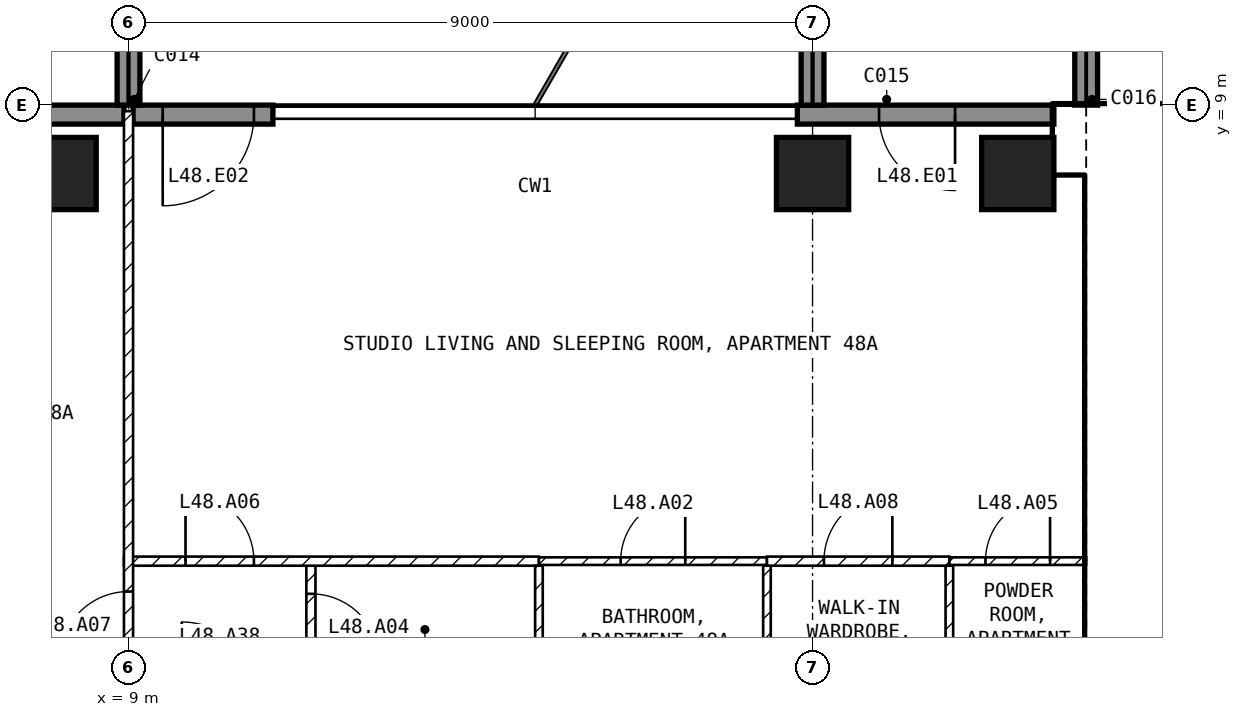
"""IFC4 building model, lengths in metres.
Left out: names, types, materials, properties, quantities, classifications, styles, units other than length and angle.
Written with IfcOpenShell. Run it as: python <this file> out.ifc"""

import sys

from ifc_helpers import new_model, si_unit, direction, frame, frame_2d, origin, origin_2d, place, context, subcontext, project, spatial, rectangle, extrude, element, fill, save


model = new_model("IFC4")
c1 = context("Model", 3, precision=1e-05, world=origin(), true_north=direction((0.0, 1.0)))
c2 = subcontext(c1, "Body", "Model", "MODEL_VIEW")
j1 = project(units=[si_unit("LENGTHUNIT", "METRE"), si_unit("PLANEANGLEUNIT", "RADIAN")], contexts=[c1])
p1 = place(None, origin())
s1 = spatial("IfcSite", under=j1, at=p1, CompositionType="ELEMENT")
p2 = place(p1, origin())
s2 = spatial("IfcBuilding", under=s1, at=p2, CompositionType="ELEMENT")
p3 = place(p2, frame((0.0, 0.0, 194.6)))
s3 = spatial("IfcBuildingStorey", under=s2, at=p3, CompositionType="ELEMENT", Elevation=194.6)
for number, where, z_axis, x_axis in (
    (1, (8.1, 8.1, -0.25), (0.0, 0.0, 1.0), (1.0, 0.0, 0.0)),
    (2, (18.0, 8.1, -0.25), (0.0, 0.0, 1.0), (1.0, 0.0, 0.0)),
    (3, (20.7, 8.1, -0.25), (0.0, 0.0, 1.0), (1.0, 0.0, 0.0)),
):
    element("IfcColumn", number, at=place(p3, frame(where, z_axis=z_axis, x_axis=x_axis)), inside=s3, PredefinedType="COLUMN", context=c2, shape_type="SweptSolid", body=[
        extrude(rectangle(XDim=0.95, YDim=0.95, at=origin_2d()), origin(), (0.0, 0.0, 1.0), 3.5),
    ])
p4 = place(p3, frame((21.175, 8.875, 0.0), z_axis=(0.0, 0.0, 1.0), x_axis=(-1.0, 0.0, 0.0)))
e4 = element("IfcWall", 4, at=p4, inside=s3, PredefinedType="SOLIDWALL", context=c2, shape_type="SweptSolid", body=[
    extrude(rectangle(XDim=3.375, YDim=0.25, at=frame_2d((1.688, 0.0))), origin(), (0.0, 0.0, 1.0), 3.25),
])
p5 = place(p4, frame((1.3, 0.0, 0.0)))
e5 = element("IfcOpeningElement", 5, at=p5, cuts=e4, PredefinedType="OPENING", context=c2, shape_type="SweptSolid", body=[
    extrude(rectangle(XDim=1.0, YDim=2.4, at=frame_2d((0.5, 1.2))), frame((0.0, 0.135, 0.0), z_axis=(0.0, -1.0, 0.0), x_axis=(1.0, 0.0, 0.0)), (0.0, 0.0, 1.0), 0.27),
])
p6 = place(p3, frame((10.9, 8.875, 0.0), z_axis=(0.0, 0.0, 1.0), x_axis=(-1.0, 0.0, 0.0)))
e6 = element("IfcWall", 6, at=p6, inside=s3, PredefinedType="SOLIDWALL", context=c2, shape_type="SweptSolid", body=[
    extrude(rectangle(XDim=1.84, YDim=0.25, at=frame_2d((0.92, 0.0))), origin(), (0.0, 0.0, 1.0), 3.25),
])
p7 = place(p6, frame((0.25, 0.0, 0.0)))
e7 = element("IfcOpeningElement", 7, at=p7, cuts=e6, PredefinedType="OPENING", context=c2, shape_type="SweptSolid", body=[
    extrude(rectangle(XDim=1.2, YDim=2.4, at=frame_2d((0.6, 1.2))), frame((0.0, 0.135, 0.0), z_axis=(0.0, -1.0, 0.0), x_axis=(1.0, 0.0, 0.0)), (0.0, 0.0, 1.0), 0.27),
])
p8 = place(p3, frame((8.94, 8.875, 0.0), z_axis=(0.0, 0.0, 1.0), x_axis=(-1.0, 0.0, 0.0)))
e8 = element("IfcWall", 8, at=p8, inside=s3, PredefinedType="SOLIDWALL", context=c2, shape_type="SweptSolid", body=[
    extrude(rectangle(XDim=3.115, YDim=0.25, at=frame_2d((1.558, 0.0))), origin(), (0.0, 0.0, 1.0), 3.25),
])
p9 = place(p8, frame((1.665, 0.0, 0.0)))
e9 = element("IfcOpeningElement", 9, at=p9, cuts=e8, PredefinedType="OPENING", context=c2, shape_type="SweptSolid", body=[
    extrude(rectangle(XDim=1.2, YDim=2.4, at=frame_2d((0.6, 1.2))), frame((0.0, 0.135, 0.0), z_axis=(0.0, -1.0, 0.0), x_axis=(1.0, 0.0, 0.0)), (0.0, 0.0, 1.0), 0.27),
])
for number, where, z_axis, x_axis in (
    (10, (9.0, 9.0, 0.0), (0.0, 0.0, 1.0), (0.0, 1.0, 0.0)),
    (11, (18.0, 9.0, 0.0), (0.0, 0.0, 1.0), (0.0, 1.0, 0.0)),
    (12, (21.6, 9.0, 0.0), (0.0, 0.0, 1.0), (0.0, 1.0, 0.0)),
):
    element("IfcWall", number, at=place(p3, frame(where, z_axis=z_axis, x_axis=x_axis)), inside=s3, PredefinedType="SOLIDWALL", context=c2, shape_type="SweptSolid", body=[
        extrude(rectangle(XDim=2.7, YDim=0.3, at=frame_2d((1.35, 0.0))), origin(), (0.0, 0.0, 1.0), 3.25),
    ])
p10 = place(p3, frame((21.175, 8.55, 0.0), z_axis=(0.0, 0.0, 1.0), x_axis=(1.0, 0.0, 0.0)))
e13 = element("IfcWall", 13, at=p10, inside=s3, PredefinedType="SHEAR", context=c2, shape_type="SweptSolid", body=[
    extrude(rectangle(XDim=8.425, YDim=0.9, at=frame_2d((4.212, 0.0))), origin(), (0.0, 0.0, 1.0), 3.25),
])
p11 = place(p3, frame((21.825, 1.2, 0.0), z_axis=(0.0, 0.0, 1.0), x_axis=(0.0, 1.0, 0.0)))
e14 = element("IfcWall", 14, at=p11, inside=s3, PredefinedType="SHEAR", context=c2, shape_type="SweptSolid", body=[
    extrude(rectangle(XDim=6.9, YDim=0.45, at=frame_2d((3.45, 0.0))), origin(), (0.0, 0.0, 1.0), 3.25),
])
p12 = place(p3, frame((22.05, 5.15, 0.0), z_axis=(0.0, 0.0, 1.0), x_axis=(1.0, 0.0, 0.0)))
e15 = element("IfcWall", 15, at=p12, inside=s3, PredefinedType="SOLIDWALL", context=c2, shape_type="SweptSolid", body=[
    extrude(rectangle(XDim=6.3, YDim=0.2, at=frame_2d((3.15, 0.0))), origin(), (0.0, 0.0, 1.0), 3.25),
])
p13 = place(p12, frame((0.2, 0.0, 0.0)))
e16 = element("IfcOpeningElement", 16, at=p13, cuts=e15, PredefinedType="OPENING", context=c2, shape_type="SweptSolid", body=[
    extrude(rectangle(XDim=1.0, YDim=2.1, at=frame_2d((0.5, 1.05))), frame((0.0, 0.11, 0.0), z_axis=(0.0, -1.0, 0.0), x_axis=(1.0, 0.0, 0.0)), (0.0, 0.0, 1.0), 0.22),
])
p14 = place(p3, frame((11.4, 2.94, 0.0), z_axis=(0.0, 0.0, 1.0), x_axis=(0.0, -1.0, 0.0)))
e17 = element("IfcWall", 17, at=p14, inside=s3, PredefinedType="PARTITIONING", context=c2, shape_type="SweptSolid", body=[
    extrude(rectangle(XDim=1.64, YDim=0.12, at=frame_2d((0.82, 0.0))), origin(), (0.0, 0.0, 1.0), 3.25),
])
p15 = place(p14, frame((0.37, 0.0, 0.0)))
e18 = element("IfcOpeningElement", 18, at=p15, cuts=e17, PredefinedType="OPENING", context=c2, shape_type="SweptSolid", body=[
    extrude(rectangle(XDim=0.9, YDim=2.1, at=frame_2d((0.45, 1.05))), frame((0.0, 0.07, 0.0), z_axis=(0.0, -1.0, 0.0), x_axis=(1.0, 0.0, 0.0)), (0.0, 0.0, 1.0), 0.14),
])
p16 = place(p3, frame((8.94, 3.0, 0.0), z_axis=(0.0, 0.0, 1.0), x_axis=(1.0, 0.0, 0.0)))
e19 = element("IfcWall", 19, at=p16, inside=s3, PredefinedType="PARTITIONING", context=c2, shape_type="SweptSolid", body=[
    extrude(rectangle(XDim=5.46, YDim=0.12, at=frame_2d((2.73, 0.0))), origin(), (0.0, 0.0, 1.0), 3.25),
])
p17 = place(p16, frame((0.81, 0.0, 0.0)))
e20 = element("IfcOpeningElement", 20, at=p17, cuts=e19, PredefinedType="OPENING", context=c2, shape_type="SweptSolid", body=[
    extrude(rectangle(XDim=0.9, YDim=2.1, at=frame_2d((0.45, 1.05))), frame((0.0, 0.07, 0.0), z_axis=(0.0, -1.0, 0.0), x_axis=(1.0, 0.0, 0.0)), (0.0, 0.0, 1.0), 0.14),
])
p18 = place(p3, frame((9.0, 1.3, 0.0), z_axis=(0.0, 0.0, 1.0), x_axis=(0.0, 1.0, 0.0)))
e21 = element("IfcWall", 21, at=p18, inside=s3, PredefinedType="PARTITIONING", context=c2, shape_type="SweptSolid", body=[
    extrude(rectangle(XDim=7.62, YDim=0.12, at=frame_2d((3.81, 0.0))), origin(), (0.0, 0.0, 1.0), 3.25),
])
p19 = place(p18, frame((0.4, 0.0, 0.0)))
e22 = element("IfcOpeningElement", 22, at=p19, cuts=e21, PredefinedType="OPENING", context=c2, shape_type="SweptSolid", body=[
    extrude(rectangle(XDim=0.9, YDim=2.1, at=frame_2d((0.45, 1.05))), frame((0.0, 0.07, 0.0), z_axis=(0.0, -1.0, 0.0), x_axis=(1.0, 0.0, 0.0)), (0.0, 0.0, 1.0), 0.14),
])
for number, where, z_axis, x_axis in (
    (23, (14.4, 2.94, 0.0), (0.0, 0.0, 1.0), (0.0, -1.0, 0.0)),
    (24, (17.4, 2.94, 0.0), (0.0, 0.0, 1.0), (0.0, -1.0, 0.0)),
):
    element("IfcWall", number, at=place(p3, frame(where, z_axis=z_axis, x_axis=x_axis)), inside=s3, PredefinedType="PARTITIONING", context=c2, shape_type="SweptSolid", body=[
        extrude(rectangle(XDim=1.64, YDim=0.1, at=frame_2d((0.82, 0.0))), origin(), (0.0, 0.0, 1.0), 3.25),
    ])
p20 = place(p3, frame((14.4, 3.0, 0.0), z_axis=(0.0, 0.0, 1.0), x_axis=(1.0, 0.0, 0.0)))
e25 = element("IfcWall", 25, at=p20, inside=s3, PredefinedType="PARTITIONING", context=c2, shape_type="SweptSolid", body=[
    extrude(rectangle(XDim=3.0, YDim=0.1, at=frame_2d((1.5, 0.0))), origin(), (0.0, 0.0, 1.0), 3.25),
])
p21 = place(p20, frame((1.075, 0.0, 0.0)))
e26 = element("IfcOpeningElement", 26, at=p21, cuts=e25, PredefinedType="OPENING", context=c2, shape_type="SweptSolid", body=[
    extrude(rectangle(XDim=0.85, YDim=2.1, at=frame_2d((0.425, 1.05))), frame((0.0, 0.06, 0.0), z_axis=(0.0, -1.0, 0.0), x_axis=(1.0, 0.0, 0.0)), (0.0, 0.0, 1.0), 0.12),
])
p22 = place(p3, frame((19.8, 2.94, 0.0), z_axis=(0.0, 0.0, 1.0), x_axis=(0.0, -1.0, 0.0)))
e27 = element("IfcWall", 27, at=p22, inside=s3, PredefinedType="PARTITIONING", context=c2, shape_type="SweptSolid", body=[
    extrude(rectangle(XDim=1.64, YDim=0.1, at=frame_2d((0.82, 0.0))), origin(), (0.0, 0.0, 1.0), 3.25),
])
p23 = place(p3, frame((17.4, 3.0, 0.0), z_axis=(0.0, 0.0, 1.0), x_axis=(1.0, 0.0, 0.0)))
e28 = element("IfcWall", 28, at=p23, inside=s3, PredefinedType="PARTITIONING", context=c2, shape_type="SweptSolid", body=[
    extrude(rectangle(XDim=2.4, YDim=0.12, at=frame_2d((1.2, 0.0))), origin(), (0.0, 0.0, 1.0), 3.25),
])
p24 = place(p23, frame((0.75, 0.0, 0.0)))
e29 = element("IfcOpeningElement", 29, at=p24, cuts=e28, PredefinedType="OPENING", context=c2, shape_type="SweptSolid", body=[
    extrude(rectangle(XDim=0.9, YDim=2.1, at=frame_2d((0.45, 1.05))), frame((0.0, 0.07, 0.0), z_axis=(0.0, -1.0, 0.0), x_axis=(1.0, 0.0, 0.0)), (0.0, 0.0, 1.0), 0.14),
])
p25 = place(p3, frame((19.8, 3.0, 0.0), z_axis=(0.0, 0.0, 1.0), x_axis=(1.0, 0.0, 0.0)))
e30 = element("IfcWall", 30, at=p25, inside=s3, PredefinedType="PARTITIONING", context=c2, shape_type="SweptSolid", body=[
    extrude(rectangle(XDim=1.8, YDim=0.1, at=frame_2d((0.9, 0.0))), origin(), (0.0, 0.0, 1.0), 3.25),
])
p26 = place(p25, frame((0.475, 0.0, 0.0)))
e31 = element("IfcOpeningElement", 31, at=p26, cuts=e30, PredefinedType="OPENING", context=c2, shape_type="SweptSolid", body=[
    extrude(rectangle(XDim=0.85, YDim=2.1, at=frame_2d((0.425, 1.05))), frame((0.0, 0.06, 0.0), z_axis=(0.0, -1.0, 0.0), x_axis=(1.0, 0.0, 0.0)), (0.0, 0.0, 1.0), 0.12),
])
p27 = place(p5, origin())
e32 = element("IfcDoor", 32, at=p27, inside=s3, OperationType="SINGLE_SWING_LEFT", PredefinedType="DOOR", context=c2, shape_type="SweptSolid", body=[
    extrude(rectangle(XDim=1.0, YDim=2.4, at=frame_2d((0.5, 1.2))), frame((0.0, 0.025, 0.0), z_axis=(0.0, -1.0, 0.0), x_axis=(1.0, 0.0, 0.0)), (0.0, 0.0, 1.0), 0.05),
])
fill(e5, e32)
p28 = place(p7, origin())
e33 = element("IfcDoor", 33, at=p28, inside=s3, OperationType="SINGLE_SWING_RIGHT", PredefinedType="DOOR", context=c2, shape_type="SweptSolid", body=[
    extrude(rectangle(XDim=1.2, YDim=2.4, at=frame_2d((0.6, 1.2))), frame((0.0, 0.025, 0.0), z_axis=(0.0, -1.0, 0.0), x_axis=(1.0, 0.0, 0.0)), (0.0, 0.0, 1.0), 0.05),
])
fill(e7, e33)
p29 = place(p13, origin())
e34 = element("IfcDoor", 34, at=p29, inside=s3, OperationType="SINGLE_SWING_LEFT", PredefinedType="DOOR", context=c2, shape_type="SweptSolid", body=[
    extrude(rectangle(XDim=1.0, YDim=2.1, at=frame_2d((0.5, 1.05))), frame((0.0, 0.025, 0.0), z_axis=(0.0, -1.0, 0.0), x_axis=(1.0, 0.0, 0.0)), (0.0, 0.0, 1.0), 0.05),
])
fill(e16, e34)
p30 = place(p21, origin())
e35 = element("IfcDoor", 35, at=p30, inside=s3, OperationType="SINGLE_SWING_RIGHT", PredefinedType="DOOR", context=c2, shape_type="SweptSolid", body=[
    extrude(rectangle(XDim=0.85, YDim=2.1, at=frame_2d((0.425, 1.05))), frame((0.0, 0.025, 0.0), z_axis=(0.0, -1.0, 0.0), x_axis=(1.0, 0.0, 0.0)), (0.0, 0.0, 1.0), 0.05),
])
fill(e26, e35)
p31 = place(p15, origin())
e36 = element("IfcDoor", 36, at=p31, inside=s3, OperationType="SINGLE_SWING_RIGHT", PredefinedType="DOOR", context=c2, shape_type="SweptSolid", body=[
    extrude(rectangle(XDim=0.9, YDim=2.1, at=frame_2d((0.45, 1.05))), frame((0.0, 0.025, 0.0), z_axis=(0.0, -1.0, 0.0), x_axis=(1.0, 0.0, 0.0)), (0.0, 0.0, 1.0), 0.05),
])
fill(e18, e36)
p32 = place(p26, origin())
e37 = element("IfcDoor", 37, at=p32, inside=s3, OperationType="SINGLE_SWING_RIGHT", PredefinedType="DOOR", context=c2, shape_type="SweptSolid", body=[
    extrude(rectangle(XDim=0.85, YDim=2.1, at=frame_2d((0.425, 1.05))), frame((0.0, 0.025, 0.0), z_axis=(0.0, -1.0, 0.0), x_axis=(1.0, 0.0, 0.0)), (0.0, 0.0, 1.0), 0.05),
])
fill(e31, e37)
p33 = place(p17, origin())
e38 = element("IfcDoor", 38, at=p33, inside=s3, OperationType="SINGLE_SWING_LEFT", PredefinedType="DOOR", context=c2, shape_type="SweptSolid", body=[
    extrude(rectangle(XDim=0.9, YDim=2.1, at=frame_2d((0.45, 1.05))), frame((0.0, 0.025, 0.0), z_axis=(0.0, -1.0, 0.0), x_axis=(1.0, 0.0, 0.0)), (0.0, 0.0, 1.0), 0.05),
])
fill(e20, e38)
p34 = place(p19, origin())
e39 = element("IfcDoor", 39, at=p34, inside=s3, OperationType="SINGLE_SWING_LEFT", PredefinedType="DOOR", context=c2, shape_type="SweptSolid", body=[
    extrude(rectangle(XDim=0.9, YDim=2.1, at=frame_2d((0.45, 1.05))), frame((0.0, 0.025, 0.0), z_axis=(0.0, -1.0, 0.0), x_axis=(1.0, 0.0, 0.0)), (0.0, 0.0, 1.0), 0.05),
])
fill(e22, e39)
p35 = place(p24, origin())
e40 = element("IfcDoor", 40, at=p35, inside=s3, OperationType="SINGLE_SWING_RIGHT", PredefinedType="DOOR", context=c2, shape_type="SweptSolid", body=[
    extrude(rectangle(XDim=0.9, YDim=2.1, at=frame_2d((0.45, 1.05))), frame((0.0, 0.025, 0.0), z_axis=(0.0, -1.0, 0.0), x_axis=(1.0, 0.0, 0.0)), (0.0, 0.0, 1.0), 0.05),
])
fill(e29, e40)
save(model, sys.argv[1])
